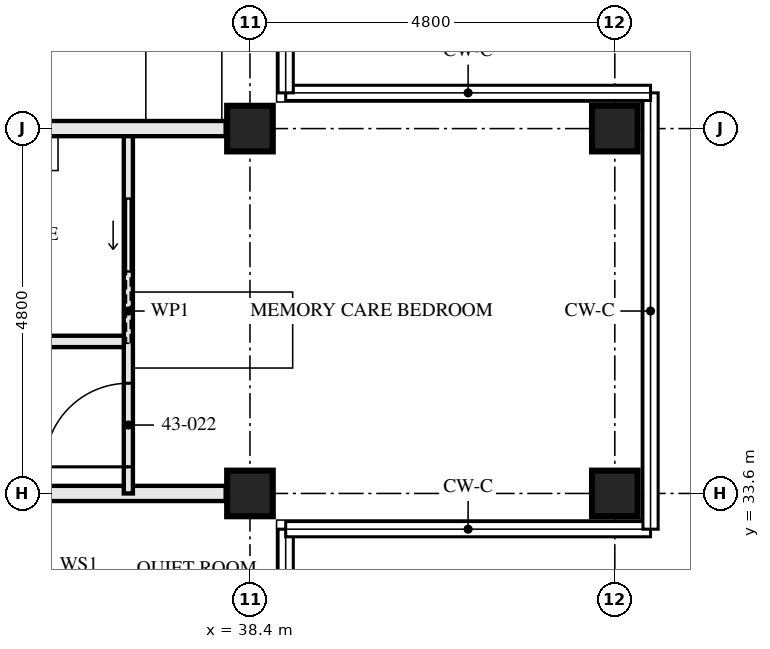
"""IFC4 building model, lengths in metres.
Left out: names, types, materials, properties, quantities, classifications, styles, units other than length and angle.
Written with IfcOpenShell. Run it as: python <this file> out.ifc"""

import sys

from ifc_helpers import new_model, si_unit, direction, frame, frame_2d, origin, origin_2d, place, context, subcontext, project, spatial, rectangle, hollow_rectangle, extrude, element, fill, save


model = new_model("IFC4")
c1 = context("Model", 3, precision=1e-05, world=origin(), true_north=direction((0.0, 1.0)))
c2 = subcontext(c1, "Body", "Model", "MODEL_VIEW")
j1 = project(units=[si_unit("LENGTHUNIT", "METRE"), si_unit("PLANEANGLEUNIT", "RADIAN")], contexts=[c1])
p1 = place(None, origin())
s1 = spatial("IfcSite", under=j1, at=p1, CompositionType="ELEMENT")
p2 = place(p1, origin())
s2 = spatial("IfcBuilding", under=s1, at=p2, CompositionType="ELEMENT")
p3 = place(p2, frame((0.0, 0.0, 158.5)))
s3 = spatial("IfcBuildingStorey", under=s2, at=p3, CompositionType="ELEMENT", Elevation=158.5)
for number, where, z_axis, x_axis in (
    (1, (38.4, 33.6, 0.0), (0.0, 0.0, 1.0), (0.0, 1.0, 0.0)),
    (2, (38.4, 38.4, 0.0), (0.0, 0.0, 1.0), (0.0, 1.0, 0.0)),
    (3, (43.2, 33.6, 0.0), (0.0, 0.0, 1.0), (0.0, 1.0, 0.0)),
    (4, (43.2, 38.4, 0.0), (0.0, 0.0, 1.0), (0.0, 1.0, 0.0)),
):
    element("IfcColumn", number, at=place(p3, frame(where, z_axis=z_axis, x_axis=x_axis)), inside=s3, PredefinedType="COLUMN", context=c2, shape_type="SweptSolid", body=[
        extrude(hollow_rectangle(XDim=0.6, YDim=0.6, WallThickness=0.06, at=origin_2d()), origin(), (0.0, 0.0, 1.0), 3.5),
    ])
p4 = place(p3, frame((38.08, 33.6, 0.0), z_axis=(0.0, 0.0, 1.0), x_axis=(-1.0, 0.0, 0.0)))
e5 = element("IfcWall", 5, at=p4, inside=s3, PredefinedType="PARTITIONING", context=c2, shape_type="SweptSolid", body=[
    extrude(rectangle(XDim=7.28, YDim=0.2, at=frame_2d((3.64, 0.0))), origin(), (0.0, 0.0, 1.0), 2.55),
])
p5 = place(p3, frame((36.8, 35.6, 0.0), z_axis=(0.0, 0.0, 1.0), x_axis=(-1.0, 0.0, 0.0)))
e6 = element("IfcWall", 6, at=p5, inside=s3, PredefinedType="PARTITIONING", context=c2, shape_type="SweptSolid", body=[
    extrude(rectangle(XDim=3.0, YDim=0.15, at=frame_2d((1.5, 0.0))), origin(), (0.0, 0.0, 1.0), 3.33),
])
p6 = place(p3, frame((36.8, 33.6, 0.0), z_axis=(0.0, 0.0, 1.0), x_axis=(0.0, 1.0, 0.0)))
e7 = element("IfcWall", 7, at=p6, inside=s3, PredefinedType="PARTITIONING", context=c2, shape_type="SweptSolid", body=[
    extrude(rectangle(XDim=4.8, YDim=0.12, at=frame_2d((2.4, 0.0))), origin(), (0.0, 0.0, 1.0), 3.33),
])
p7 = place(p6, frame((0.35, 0.0, 0.0)))
e8 = element("IfcOpeningElement", 8, at=p7, cuts=e7, PredefinedType="OPENING", context=c2, shape_type="SweptSolid", body=[
    extrude(rectangle(XDim=1.1, YDim=2.1, at=frame_2d((0.55, 1.05))), frame((0.0, 0.071, 0.0), z_axis=(0.0, -1.0, 0.0), x_axis=(1.0, 0.0, 0.0)), (0.0, 0.0, 1.0), 0.141),
])
p8 = place(p6, frame((2.925, 0.0, 0.0)))
e9 = element("IfcOpeningElement", 9, at=p8, cuts=e7, PredefinedType="OPENING", context=c2, shape_type="SweptSolid", body=[
    extrude(rectangle(XDim=0.95, YDim=2.1, at=frame_2d((0.475, 1.05))), frame((0.0, 0.071, 0.0), z_axis=(0.0, -1.0, 0.0), x_axis=(1.0, 0.0, 0.0)), (0.0, 0.0, 1.0), 0.141),
])
p9 = place(p3, frame((38.08, 38.4, 0.0), z_axis=(0.0, 0.0, 1.0), x_axis=(-1.0, 0.0, 0.0)))
e10 = element("IfcWall", 10, at=p9, inside=s3, PredefinedType="PARTITIONING", context=c2, shape_type="SweptSolid", body=[
    extrude(rectangle(XDim=7.28, YDim=0.2, at=frame_2d((3.64, 0.0))), origin(), (0.0, 0.0, 1.0), 2.55),
])
p10 = place(p7, origin())
e11 = element("IfcDoor", 11, at=p10, inside=s3, OperationType="SINGLE_SWING_RIGHT", PredefinedType="DOOR", context=c2, shape_type="SweptSolid", body=[
    extrude(rectangle(XDim=1.1, YDim=2.1, at=frame_2d((0.55, 1.05))), frame((0.0, 0.022, 0.0), z_axis=(0.0, -1.0, 0.0), x_axis=(1.0, 0.0, 0.0)), (0.0, 0.0, 1.0), 0.044),
])
fill(e8, e11)
p11 = place(p8, origin())
e12 = element("IfcDoor", 12, at=p11, inside=s3, OperationType="SLIDING_TO_RIGHT", PredefinedType="DOOR", context=c2, shape_type="SweptSolid", body=[
    extrude(rectangle(XDim=0.95, YDim=2.1, at=frame_2d((0.475, 1.05))), frame((0.0, 0.022, 0.0), z_axis=(0.0, -1.0, 0.0), x_axis=(1.0, 0.0, 0.0)), (0.0, 0.0, 1.0), 0.044),
])
fill(e9, e12)
save(model, sys.argv[1])
